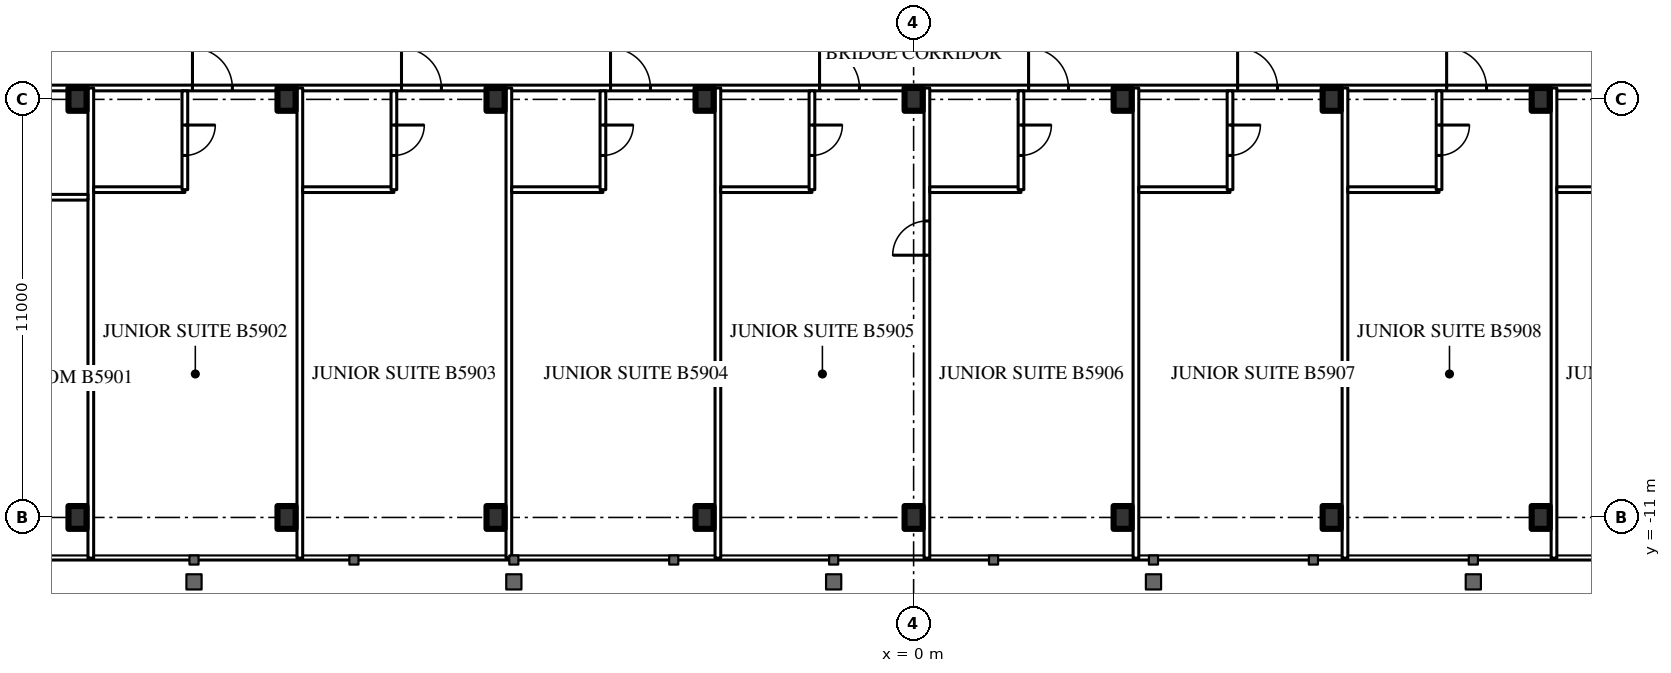
"""IFC4 building model, lengths in metres.
Left out: names, types, materials, properties, quantities, classifications, styles, units other than length and angle.
Written with IfcOpenShell. Run it as: python <this file> out.ifc"""

import sys

from ifc_helpers import new_model, si_unit, direction, frame, frame_2d, origin, origin_2d, place, context, subcontext, project, spatial, rectangle, i_section, extrude, element, fill, save


model = new_model("IFC4")
c1 = context("Model", 3, precision=1e-05, world=origin(), true_north=direction((0.0, 1.0)))
c2 = subcontext(c1, "Body", "Model", "MODEL_VIEW")
j1 = project(units=[si_unit("LENGTHUNIT", "METRE"), si_unit("PLANEANGLEUNIT", "RADIAN")], contexts=[c1])
p1 = place(None, origin())
s1 = spatial("IfcSite", under=j1, at=p1, CompositionType="ELEMENT")
p2 = place(p1, origin())
s2 = spatial("IfcBuilding", under=s1, at=p2, CompositionType="ELEMENT")
p3 = place(p2, frame((0.0, 0.0, 222.5)))
s3 = spatial("IfcBuildingStorey", under=s2, at=p3, CompositionType="ELEMENT", Elevation=222.5)
for number, where, z_axis, x_axis in (
    (1, (-22.0, -11.0, 0.0), (0.0, 0.0, 1.0), (1.0, 0.0, 0.0)),
    (2, (-16.5, -11.0, 0.0), (0.0, 0.0, 1.0), (1.0, 0.0, 0.0)),
    (3, (-11.0, -11.0, 0.0), (0.0, 0.0, 1.0), (1.0, 0.0, 0.0)),
    (4, (-5.5, -11.0, 0.0), (0.0, 0.0, 1.0), (1.0, 0.0, 0.0)),
    (5, (0.0, -11.0, 0.0), (0.0, 0.0, 1.0), (1.0, 0.0, 0.0)),
    (6, (5.5, -11.0, 0.0), (0.0, 0.0, 1.0), (1.0, 0.0, 0.0)),
    (7, (11.0, -11.0, 0.0), (0.0, 0.0, 1.0), (1.0, 0.0, 0.0)),
    (8, (16.5, -11.0, 0.0), (0.0, 0.0, 1.0), (1.0, 0.0, 0.0)),
    (9, (-22.0, 0.0, 0.0), (0.0, 0.0, 1.0), (1.0, 0.0, 0.0)),
    (10, (-16.5, 0.0, 0.0), (0.0, 0.0, 1.0), (1.0, 0.0, 0.0)),
    (11, (-11.0, 0.0, 0.0), (0.0, 0.0, 1.0), (1.0, 0.0, 0.0)),
    (12, (-5.5, 0.0, 0.0), (0.0, 0.0, 1.0), (1.0, 0.0, 0.0)),
    (13, (0.0, 0.0, 0.0), (0.0, 0.0, 1.0), (1.0, 0.0, 0.0)),
    (14, (5.5, 0.0, 0.0), (0.0, 0.0, 1.0), (1.0, 0.0, 0.0)),
    (15, (11.0, 0.0, 0.0), (0.0, 0.0, 1.0), (1.0, 0.0, 0.0)),
    (16, (16.5, 0.0, 0.0), (0.0, 0.0, 1.0), (1.0, 0.0, 0.0)),
):
    element("IfcColumn", number, at=place(p3, frame(where, z_axis=z_axis, x_axis=x_axis)), inside=s3, PredefinedType="COLUMN", context=c2, shape_type="SweptSolid", body=[
        extrude(i_section(OverallWidth=0.476, OverallDepth=0.6, WebThickness=0.1, FlangeThickness=0.14, FilletRadius=0.02, at=origin_2d()), origin(), (0.0, 0.0, 1.0), 3.6),
    ])
p4 = place(p3, frame((-27.5, 0.3, 0.0), z_axis=(0.0, 0.0, 1.0), x_axis=(1.0, 0.0, 0.0)))
e17 = element("IfcWall", 17, at=p4, inside=s3, PredefinedType="PARTITIONING", context=c2, shape_type="SweptSolid", body=[
    extrude(rectangle(XDim=55.0, YDim=0.15, at=frame_2d((27.5, 0.0))), origin(), (0.0, 0.0, 1.0), 2.4),
])
p5 = place(p4, frame((1.575, 0.0, 0.0)))
e18 = element("IfcOpeningElement", 18, at=p5, cuts=e17, PredefinedType="OPENING", context=c2, shape_type="SweptSolid", body=[
    extrude(rectangle(XDim=1.0, YDim=2.2, at=frame_2d((0.5, 1.1))), frame((0.0, 0.085, 0.0), z_axis=(0.0, -1.0, 0.0), x_axis=(1.0, 0.0, 0.0)), (0.0, 0.0, 1.0), 0.17),
])
p6 = place(p4, frame((8.525, 0.0, 0.0)))
e19 = element("IfcOpeningElement", 19, at=p6, cuts=e17, PredefinedType="OPENING", context=c2, shape_type="SweptSolid", body=[
    extrude(rectangle(XDim=1.05, YDim=2.4, at=frame_2d((0.525, 1.2))), frame((0.0, 0.085, 0.0), z_axis=(0.0, -1.0, 0.0), x_axis=(1.0, 0.0, 0.0)), (0.0, 0.0, 1.0), 0.17),
])
p7 = place(p4, frame((14.025, 0.0, 0.0)))
e20 = element("IfcOpeningElement", 20, at=p7, cuts=e17, PredefinedType="OPENING", context=c2, shape_type="SweptSolid", body=[
    extrude(rectangle(XDim=1.05, YDim=2.4, at=frame_2d((0.525, 1.2))), frame((0.0, 0.085, 0.0), z_axis=(0.0, -1.0, 0.0), x_axis=(1.0, 0.0, 0.0)), (0.0, 0.0, 1.0), 0.17),
])
p8 = place(p4, frame((19.525, 0.0, 0.0)))
e21 = element("IfcOpeningElement", 21, at=p8, cuts=e17, PredefinedType="OPENING", context=c2, shape_type="SweptSolid", body=[
    extrude(rectangle(XDim=1.05, YDim=2.4, at=frame_2d((0.525, 1.2))), frame((0.0, 0.085, 0.0), z_axis=(0.0, -1.0, 0.0), x_axis=(1.0, 0.0, 0.0)), (0.0, 0.0, 1.0), 0.17),
])
p9 = place(p4, frame((25.025, 0.0, 0.0)))
e22 = element("IfcOpeningElement", 22, at=p9, cuts=e17, PredefinedType="OPENING", context=c2, shape_type="SweptSolid", body=[
    extrude(rectangle(XDim=1.05, YDim=2.4, at=frame_2d((0.525, 1.2))), frame((0.0, 0.085, 0.0), z_axis=(0.0, -1.0, 0.0), x_axis=(1.0, 0.0, 0.0)), (0.0, 0.0, 1.0), 0.17),
])
p10 = place(p4, frame((30.525, 0.0, 0.0)))
e23 = element("IfcOpeningElement", 23, at=p10, cuts=e17, PredefinedType="OPENING", context=c2, shape_type="SweptSolid", body=[
    extrude(rectangle(XDim=1.05, YDim=2.4, at=frame_2d((0.525, 1.2))), frame((0.0, 0.085, 0.0), z_axis=(0.0, -1.0, 0.0), x_axis=(1.0, 0.0, 0.0)), (0.0, 0.0, 1.0), 0.17),
])
p11 = place(p4, frame((36.025, 0.0, 0.0)))
e24 = element("IfcOpeningElement", 24, at=p11, cuts=e17, PredefinedType="OPENING", context=c2, shape_type="SweptSolid", body=[
    extrude(rectangle(XDim=1.05, YDim=2.4, at=frame_2d((0.525, 1.2))), frame((0.0, 0.085, 0.0), z_axis=(0.0, -1.0, 0.0), x_axis=(1.0, 0.0, 0.0)), (0.0, 0.0, 1.0), 0.17),
])
p12 = place(p4, frame((41.525, 0.0, 0.0)))
e25 = element("IfcOpeningElement", 25, at=p12, cuts=e17, PredefinedType="OPENING", context=c2, shape_type="SweptSolid", body=[
    extrude(rectangle(XDim=1.05, YDim=2.4, at=frame_2d((0.525, 1.2))), frame((0.0, 0.085, 0.0), z_axis=(0.0, -1.0, 0.0), x_axis=(1.0, 0.0, 0.0)), (0.0, 0.0, 1.0), 0.17),
])
p13 = place(p4, frame((47.025, 0.0, 0.0)))
e26 = element("IfcOpeningElement", 26, at=p13, cuts=e17, PredefinedType="OPENING", context=c2, shape_type="SweptSolid", body=[
    extrude(rectangle(XDim=1.05, YDim=2.4, at=frame_2d((0.525, 1.2))), frame((0.0, 0.085, 0.0), z_axis=(0.0, -1.0, 0.0), x_axis=(1.0, 0.0, 0.0)), (0.0, 0.0, 1.0), 0.17),
])
p14 = place(p4, frame((52.525, 0.0, 0.0)))
e27 = element("IfcOpeningElement", 27, at=p14, cuts=e17, PredefinedType="OPENING", context=c2, shape_type="SweptSolid", body=[
    extrude(rectangle(XDim=1.05, YDim=2.4, at=frame_2d((0.525, 1.2))), frame((0.0, 0.085, 0.0), z_axis=(0.0, -1.0, 0.0), x_axis=(1.0, 0.0, 0.0)), (0.0, 0.0, 1.0), 0.17),
])
for number, where, z_axis, x_axis in (
    (28, (-21.65, -12.07, 0.0), (0.0, 0.0, 1.0), (0.0, 1.0, 0.0)),
    (29, (-16.15, -12.07, 0.0), (0.0, 0.0, 1.0), (0.0, 1.0, 0.0)),
    (30, (-10.65, -12.07, 0.0), (0.0, 0.0, 1.0), (0.0, 1.0, 0.0)),
    (31, (-5.15, -12.07, 0.0), (0.0, 0.0, 1.0), (0.0, 1.0, 0.0)),
):
    element("IfcWall", number, at=place(p3, frame(where, z_axis=z_axis, x_axis=x_axis)), inside=s3, PredefinedType="PARTITIONING", context=c2, shape_type="SweptSolid", body=[
        extrude(rectangle(XDim=12.37, YDim=0.15, at=frame_2d((6.185, 0.0))), origin(), (0.0, 0.0, 1.0), 3.4),
    ])
p15 = place(p3, frame((0.35, -12.07, 0.0), z_axis=(0.0, 0.0, 1.0), x_axis=(0.0, 1.0, 0.0)))
e32 = element("IfcWall", 32, at=p15, inside=s3, PredefinedType="PARTITIONING", context=c2, shape_type="SweptSolid", body=[
    extrude(rectangle(XDim=12.37, YDim=0.15, at=frame_2d((6.185, 0.0))), origin(), (0.0, 0.0, 1.0), 3.4),
])
p16 = place(p15, frame((7.97, 0.0, 0.0)))
e33 = element("IfcOpeningElement", 33, at=p16, cuts=e32, PredefinedType="OPENING", context=c2, shape_type="SweptSolid", body=[
    extrude(rectangle(XDim=0.9, YDim=2.2, at=frame_2d((0.45, 1.1))), frame((0.0, 0.085, 0.0), z_axis=(0.0, -1.0, 0.0), x_axis=(1.0, 0.0, 0.0)), (0.0, 0.0, 1.0), 0.17),
])
for number, where, z_axis, x_axis in (
    (34, (5.85, -12.07, 0.0), (0.0, 0.0, 1.0), (0.0, 1.0, 0.0)),
    (35, (11.35, -12.07, 0.0), (0.0, 0.0, 1.0), (0.0, 1.0, 0.0)),
    (36, (16.85, -12.07, 0.0), (0.0, 0.0, 1.0), (0.0, 1.0, 0.0)),
):
    element("IfcWall", number, at=place(p3, frame(where, z_axis=z_axis, x_axis=x_axis)), inside=s3, PredefinedType="PARTITIONING", context=c2, shape_type="SweptSolid", body=[
        extrude(rectangle(XDim=12.37, YDim=0.15, at=frame_2d((6.185, 0.0))), origin(), (0.0, 0.0, 1.0), 3.4),
    ])
p17 = place(p3, frame((-24.525, -2.575, 0.0), z_axis=(0.0, 0.0, 1.0), x_axis=(1.0, 0.0, 0.0)))
e37 = element("IfcWall", 37, at=p17, inside=s3, PredefinedType="PARTITIONING", context=c2, shape_type="SweptSolid", body=[
    extrude(rectangle(XDim=2.8, YDim=0.15, at=frame_2d((1.4, 0.0))), origin(), (0.0, 0.0, 1.0), 3.4),
])
p18 = place(p3, frame((-21.575, -2.375, 0.0), z_axis=(0.0, 0.0, 1.0), x_axis=(1.0, 0.0, 0.0)))
e38 = element("IfcWall", 38, at=p18, inside=s3, PredefinedType="PARTITIONING", context=c2, shape_type="SweptSolid", body=[
    extrude(rectangle(XDim=2.4, YDim=0.15, at=frame_2d((1.2, 0.0))), origin(), (0.0, 0.0, 1.0), 3.4),
])
p19 = place(p3, frame((-19.175, -2.375, 0.0), z_axis=(0.0, 0.0, 1.0), x_axis=(0.0, 1.0, 0.0)))
e39 = element("IfcWall", 39, at=p19, inside=s3, PredefinedType="PARTITIONING", context=c2, shape_type="SweptSolid", body=[
    extrude(rectangle(XDim=2.6, YDim=0.15, at=frame_2d((1.3, 0.0))), origin(), (0.0, 0.0, 1.0), 3.4),
])
p20 = place(p19, frame((0.9, 0.0, 0.0)))
e40 = element("IfcOpeningElement", 40, at=p20, cuts=e39, PredefinedType="OPENING", context=c2, shape_type="SweptSolid", body=[
    extrude(rectangle(XDim=0.8, YDim=2.2, at=frame_2d((0.4, 1.1))), frame((0.0, 0.085, 0.0), z_axis=(0.0, -1.0, 0.0), x_axis=(1.0, 0.0, 0.0)), (0.0, 0.0, 1.0), 0.17),
])
p21 = place(p3, frame((-16.075, -2.375, 0.0), z_axis=(0.0, 0.0, 1.0), x_axis=(1.0, 0.0, 0.0)))
e41 = element("IfcWall", 41, at=p21, inside=s3, PredefinedType="PARTITIONING", context=c2, shape_type="SweptSolid", body=[
    extrude(rectangle(XDim=2.4, YDim=0.15, at=frame_2d((1.2, 0.0))), origin(), (0.0, 0.0, 1.0), 3.4),
])
p22 = place(p3, frame((-13.675, -2.375, 0.0), z_axis=(0.0, 0.0, 1.0), x_axis=(0.0, 1.0, 0.0)))
e42 = element("IfcWall", 42, at=p22, inside=s3, PredefinedType="PARTITIONING", context=c2, shape_type="SweptSolid", body=[
    extrude(rectangle(XDim=2.6, YDim=0.15, at=frame_2d((1.3, 0.0))), origin(), (0.0, 0.0, 1.0), 3.4),
])
p23 = place(p22, frame((0.9, 0.0, 0.0)))
e43 = element("IfcOpeningElement", 43, at=p23, cuts=e42, PredefinedType="OPENING", context=c2, shape_type="SweptSolid", body=[
    extrude(rectangle(XDim=0.8, YDim=2.2, at=frame_2d((0.4, 1.1))), frame((0.0, 0.085, 0.0), z_axis=(0.0, -1.0, 0.0), x_axis=(1.0, 0.0, 0.0)), (0.0, 0.0, 1.0), 0.17),
])
p24 = place(p3, frame((-10.575, -2.375, 0.0), z_axis=(0.0, 0.0, 1.0), x_axis=(1.0, 0.0, 0.0)))
e44 = element("IfcWall", 44, at=p24, inside=s3, PredefinedType="PARTITIONING", context=c2, shape_type="SweptSolid", body=[
    extrude(rectangle(XDim=2.4, YDim=0.15, at=frame_2d((1.2, 0.0))), origin(), (0.0, 0.0, 1.0), 3.4),
])
p25 = place(p3, frame((-8.175, -2.375, 0.0), z_axis=(0.0, 0.0, 1.0), x_axis=(0.0, 1.0, 0.0)))
e45 = element("IfcWall", 45, at=p25, inside=s3, PredefinedType="PARTITIONING", context=c2, shape_type="SweptSolid", body=[
    extrude(rectangle(XDim=2.6, YDim=0.15, at=frame_2d((1.3, 0.0))), origin(), (0.0, 0.0, 1.0), 3.4),
])
p26 = place(p25, frame((0.9, 0.0, 0.0)))
e46 = element("IfcOpeningElement", 46, at=p26, cuts=e45, PredefinedType="OPENING", context=c2, shape_type="SweptSolid", body=[
    extrude(rectangle(XDim=0.8, YDim=2.2, at=frame_2d((0.4, 1.1))), frame((0.0, 0.085, 0.0), z_axis=(0.0, -1.0, 0.0), x_axis=(1.0, 0.0, 0.0)), (0.0, 0.0, 1.0), 0.17),
])
p27 = place(p3, frame((-5.075, -2.375, 0.0), z_axis=(0.0, 0.0, 1.0), x_axis=(1.0, 0.0, 0.0)))
e47 = element("IfcWall", 47, at=p27, inside=s3, PredefinedType="PARTITIONING", context=c2, shape_type="SweptSolid", body=[
    extrude(rectangle(XDim=2.4, YDim=0.15, at=frame_2d((1.2, 0.0))), origin(), (0.0, 0.0, 1.0), 3.4),
])
p28 = place(p3, frame((-2.675, -2.375, 0.0), z_axis=(0.0, 0.0, 1.0), x_axis=(0.0, 1.0, 0.0)))
e48 = element("IfcWall", 48, at=p28, inside=s3, PredefinedType="PARTITIONING", context=c2, shape_type="SweptSolid", body=[
    extrude(rectangle(XDim=2.6, YDim=0.15, at=frame_2d((1.3, 0.0))), origin(), (0.0, 0.0, 1.0), 3.4),
])
p29 = place(p28, frame((0.9, 0.0, 0.0)))
e49 = element("IfcOpeningElement", 49, at=p29, cuts=e48, PredefinedType="OPENING", context=c2, shape_type="SweptSolid", body=[
    extrude(rectangle(XDim=0.8, YDim=2.2, at=frame_2d((0.4, 1.1))), frame((0.0, 0.085, 0.0), z_axis=(0.0, -1.0, 0.0), x_axis=(1.0, 0.0, 0.0)), (0.0, 0.0, 1.0), 0.17),
])
p30 = place(p3, frame((0.425, -2.375, 0.0), z_axis=(0.0, 0.0, 1.0), x_axis=(1.0, 0.0, 0.0)))
e50 = element("IfcWall", 50, at=p30, inside=s3, PredefinedType="PARTITIONING", context=c2, shape_type="SweptSolid", body=[
    extrude(rectangle(XDim=2.4, YDim=0.15, at=frame_2d((1.2, 0.0))), origin(), (0.0, 0.0, 1.0), 3.4),
])
p31 = place(p3, frame((2.825, -2.375, 0.0), z_axis=(0.0, 0.0, 1.0), x_axis=(0.0, 1.0, 0.0)))
e51 = element("IfcWall", 51, at=p31, inside=s3, PredefinedType="PARTITIONING", context=c2, shape_type="SweptSolid", body=[
    extrude(rectangle(XDim=2.6, YDim=0.15, at=frame_2d((1.3, 0.0))), origin(), (0.0, 0.0, 1.0), 3.4),
])
p32 = place(p31, frame((0.9, 0.0, 0.0)))
e52 = element("IfcOpeningElement", 52, at=p32, cuts=e51, PredefinedType="OPENING", context=c2, shape_type="SweptSolid", body=[
    extrude(rectangle(XDim=0.8, YDim=2.2, at=frame_2d((0.4, 1.1))), frame((0.0, 0.085, 0.0), z_axis=(0.0, -1.0, 0.0), x_axis=(1.0, 0.0, 0.0)), (0.0, 0.0, 1.0), 0.17),
])
p33 = place(p3, frame((5.925, -2.375, 0.0), z_axis=(0.0, 0.0, 1.0), x_axis=(1.0, 0.0, 0.0)))
e53 = element("IfcWall", 53, at=p33, inside=s3, PredefinedType="PARTITIONING", context=c2, shape_type="SweptSolid", body=[
    extrude(rectangle(XDim=2.4, YDim=0.15, at=frame_2d((1.2, 0.0))), origin(), (0.0, 0.0, 1.0), 3.4),
])
p34 = place(p3, frame((8.325, -2.375, 0.0), z_axis=(0.0, 0.0, 1.0), x_axis=(0.0, 1.0, 0.0)))
e54 = element("IfcWall", 54, at=p34, inside=s3, PredefinedType="PARTITIONING", context=c2, shape_type="SweptSolid", body=[
    extrude(rectangle(XDim=2.6, YDim=0.15, at=frame_2d((1.3, 0.0))), origin(), (0.0, 0.0, 1.0), 3.4),
])
p35 = place(p34, frame((0.9, 0.0, 0.0)))
e55 = element("IfcOpeningElement", 55, at=p35, cuts=e54, PredefinedType="OPENING", context=c2, shape_type="SweptSolid", body=[
    extrude(rectangle(XDim=0.8, YDim=2.2, at=frame_2d((0.4, 1.1))), frame((0.0, 0.085, 0.0), z_axis=(0.0, -1.0, 0.0), x_axis=(1.0, 0.0, 0.0)), (0.0, 0.0, 1.0), 0.17),
])
p36 = place(p3, frame((11.425, -2.375, 0.0), z_axis=(0.0, 0.0, 1.0), x_axis=(1.0, 0.0, 0.0)))
e56 = element("IfcWall", 56, at=p36, inside=s3, PredefinedType="PARTITIONING", context=c2, shape_type="SweptSolid", body=[
    extrude(rectangle(XDim=2.4, YDim=0.15, at=frame_2d((1.2, 0.0))), origin(), (0.0, 0.0, 1.0), 3.4),
])
p37 = place(p3, frame((13.825, -2.375, 0.0), z_axis=(0.0, 0.0, 1.0), x_axis=(0.0, 1.0, 0.0)))
e57 = element("IfcWall", 57, at=p37, inside=s3, PredefinedType="PARTITIONING", context=c2, shape_type="SweptSolid", body=[
    extrude(rectangle(XDim=2.6, YDim=0.15, at=frame_2d((1.3, 0.0))), origin(), (0.0, 0.0, 1.0), 3.4),
])
p38 = place(p37, frame((0.9, 0.0, 0.0)))
e58 = element("IfcOpeningElement", 58, at=p38, cuts=e57, PredefinedType="OPENING", context=c2, shape_type="SweptSolid", body=[
    extrude(rectangle(XDim=0.8, YDim=2.2, at=frame_2d((0.4, 1.1))), frame((0.0, 0.085, 0.0), z_axis=(0.0, -1.0, 0.0), x_axis=(1.0, 0.0, 0.0)), (0.0, 0.0, 1.0), 0.17),
])
p39 = place(p3, frame((16.925, -2.375, 0.0), z_axis=(0.0, 0.0, 1.0), x_axis=(1.0, 0.0, 0.0)))
e59 = element("IfcWall", 59, at=p39, inside=s3, PredefinedType="PARTITIONING", context=c2, shape_type="SweptSolid", body=[
    extrude(rectangle(XDim=2.4, YDim=0.15, at=frame_2d((1.2, 0.0))), origin(), (0.0, 0.0, 1.0), 3.4),
])
p40 = place(p20, origin())
e60 = element("IfcDoor", 60, at=p40, inside=s3, OperationType="SINGLE_SWING_RIGHT", PredefinedType="DOOR", context=c2, shape_type="SweptSolid", body=[
    extrude(rectangle(XDim=0.8, YDim=2.2, at=frame_2d((0.4, 1.1))), frame((0.0, 0.025, 0.0), z_axis=(0.0, -1.0, 0.0), x_axis=(1.0, 0.0, 0.0)), (0.0, 0.0, 1.0), 0.05),
])
fill(e40, e60)
p41 = place(p6, origin())
e61 = element("IfcDoor", 61, at=p41, inside=s3, OperationType="SINGLE_SWING_LEFT", PredefinedType="DOOR", context=c2, shape_type="SweptSolid", body=[
    extrude(rectangle(XDim=1.05, YDim=2.4, at=frame_2d((0.525, 1.2))), frame((0.0, 0.025, 0.0), z_axis=(0.0, -1.0, 0.0), x_axis=(1.0, 0.0, 0.0)), (0.0, 0.0, 1.0), 0.05),
])
fill(e19, e61)
p42 = place(p23, origin())
e62 = element("IfcDoor", 62, at=p42, inside=s3, OperationType="SINGLE_SWING_RIGHT", PredefinedType="DOOR", context=c2, shape_type="SweptSolid", body=[
    extrude(rectangle(XDim=0.8, YDim=2.2, at=frame_2d((0.4, 1.1))), frame((0.0, 0.025, 0.0), z_axis=(0.0, -1.0, 0.0), x_axis=(1.0, 0.0, 0.0)), (0.0, 0.0, 1.0), 0.05),
])
fill(e43, e62)
p43 = place(p7, origin())
e63 = element("IfcDoor", 63, at=p43, inside=s3, OperationType="SINGLE_SWING_LEFT", PredefinedType="DOOR", context=c2, shape_type="SweptSolid", body=[
    extrude(rectangle(XDim=1.05, YDim=2.4, at=frame_2d((0.525, 1.2))), frame((0.0, 0.025, 0.0), z_axis=(0.0, -1.0, 0.0), x_axis=(1.0, 0.0, 0.0)), (0.0, 0.0, 1.0), 0.05),
])
fill(e20, e63)
p44 = place(p26, origin())
e64 = element("IfcDoor", 64, at=p44, inside=s3, OperationType="SINGLE_SWING_RIGHT", PredefinedType="DOOR", context=c2, shape_type="SweptSolid", body=[
    extrude(rectangle(XDim=0.8, YDim=2.2, at=frame_2d((0.4, 1.1))), frame((0.0, 0.025, 0.0), z_axis=(0.0, -1.0, 0.0), x_axis=(1.0, 0.0, 0.0)), (0.0, 0.0, 1.0), 0.05),
])
fill(e46, e64)
p45 = place(p8, origin())
e65 = element("IfcDoor", 65, at=p45, inside=s3, OperationType="SINGLE_SWING_LEFT", PredefinedType="DOOR", context=c2, shape_type="SweptSolid", body=[
    extrude(rectangle(XDim=1.05, YDim=2.4, at=frame_2d((0.525, 1.2))), frame((0.0, 0.025, 0.0), z_axis=(0.0, -1.0, 0.0), x_axis=(1.0, 0.0, 0.0)), (0.0, 0.0, 1.0), 0.05),
])
fill(e21, e65)
p46 = place(p29, origin())
e66 = element("IfcDoor", 66, at=p46, inside=s3, OperationType="SINGLE_SWING_RIGHT", PredefinedType="DOOR", context=c2, shape_type="SweptSolid", body=[
    extrude(rectangle(XDim=0.8, YDim=2.2, at=frame_2d((0.4, 1.1))), frame((0.0, 0.025, 0.0), z_axis=(0.0, -1.0, 0.0), x_axis=(1.0, 0.0, 0.0)), (0.0, 0.0, 1.0), 0.05),
])
fill(e49, e66)
p47 = place(p9, origin())
e67 = element("IfcDoor", 67, at=p47, inside=s3, OperationType="SINGLE_SWING_LEFT", PredefinedType="DOOR", context=c2, shape_type="SweptSolid", body=[
    extrude(rectangle(XDim=1.05, YDim=2.4, at=frame_2d((0.525, 1.2))), frame((0.0, 0.025, 0.0), z_axis=(0.0, -1.0, 0.0), x_axis=(1.0, 0.0, 0.0)), (0.0, 0.0, 1.0), 0.05),
])
fill(e22, e67)
p48 = place(p32, origin())
e68 = element("IfcDoor", 68, at=p48, inside=s3, OperationType="SINGLE_SWING_RIGHT", PredefinedType="DOOR", context=c2, shape_type="SweptSolid", body=[
    extrude(rectangle(XDim=0.8, YDim=2.2, at=frame_2d((0.4, 1.1))), frame((0.0, 0.025, 0.0), z_axis=(0.0, -1.0, 0.0), x_axis=(1.0, 0.0, 0.0)), (0.0, 0.0, 1.0), 0.05),
])
fill(e52, e68)
p49 = place(p10, origin())
e69 = element("IfcDoor", 69, at=p49, inside=s3, OperationType="SINGLE_SWING_LEFT", PredefinedType="DOOR", context=c2, shape_type="SweptSolid", body=[
    extrude(rectangle(XDim=1.05, YDim=2.4, at=frame_2d((0.525, 1.2))), frame((0.0, 0.025, 0.0), z_axis=(0.0, -1.0, 0.0), x_axis=(1.0, 0.0, 0.0)), (0.0, 0.0, 1.0), 0.05),
])
fill(e23, e69)
p50 = place(p35, origin())
e70 = element("IfcDoor", 70, at=p50, inside=s3, OperationType="SINGLE_SWING_RIGHT", PredefinedType="DOOR", context=c2, shape_type="SweptSolid", body=[
    extrude(rectangle(XDim=0.8, YDim=2.2, at=frame_2d((0.4, 1.1))), frame((0.0, 0.025, 0.0), z_axis=(0.0, -1.0, 0.0), x_axis=(1.0, 0.0, 0.0)), (0.0, 0.0, 1.0), 0.05),
])
fill(e55, e70)
p51 = place(p11, origin())
e71 = element("IfcDoor", 71, at=p51, inside=s3, OperationType="SINGLE_SWING_LEFT", PredefinedType="DOOR", context=c2, shape_type="SweptSolid", body=[
    extrude(rectangle(XDim=1.05, YDim=2.4, at=frame_2d((0.525, 1.2))), frame((0.0, 0.025, 0.0), z_axis=(0.0, -1.0, 0.0), x_axis=(1.0, 0.0, 0.0)), (0.0, 0.0, 1.0), 0.05),
])
fill(e24, e71)
p52 = place(p38, origin())
e72 = element("IfcDoor", 72, at=p52, inside=s3, OperationType="SINGLE_SWING_RIGHT", PredefinedType="DOOR", context=c2, shape_type="SweptSolid", body=[
    extrude(rectangle(XDim=0.8, YDim=2.2, at=frame_2d((0.4, 1.1))), frame((0.0, 0.025, 0.0), z_axis=(0.0, -1.0, 0.0), x_axis=(1.0, 0.0, 0.0)), (0.0, 0.0, 1.0), 0.05),
])
fill(e58, e72)
p53 = place(p12, origin())
e73 = element("IfcDoor", 73, at=p53, inside=s3, OperationType="SINGLE_SWING_LEFT", PredefinedType="DOOR", context=c2, shape_type="SweptSolid", body=[
    extrude(rectangle(XDim=1.05, YDim=2.4, at=frame_2d((0.525, 1.2))), frame((0.0, 0.025, 0.0), z_axis=(0.0, -1.0, 0.0), x_axis=(1.0, 0.0, 0.0)), (0.0, 0.0, 1.0), 0.05),
])
fill(e25, e73)
p54 = place(p16, origin())
e74 = element("IfcDoor", 74, at=p54, inside=s3, OperationType="SINGLE_SWING_LEFT", PredefinedType="DOOR", context=c2, shape_type="SweptSolid", body=[
    extrude(rectangle(XDim=0.9, YDim=2.2, at=frame_2d((0.45, 1.1))), frame((0.0, 0.025, 0.0), z_axis=(0.0, -1.0, 0.0), x_axis=(1.0, 0.0, 0.0)), (0.0, 0.0, 1.0), 0.05),
])
fill(e33, e74)
save(model, sys.argv[1])
